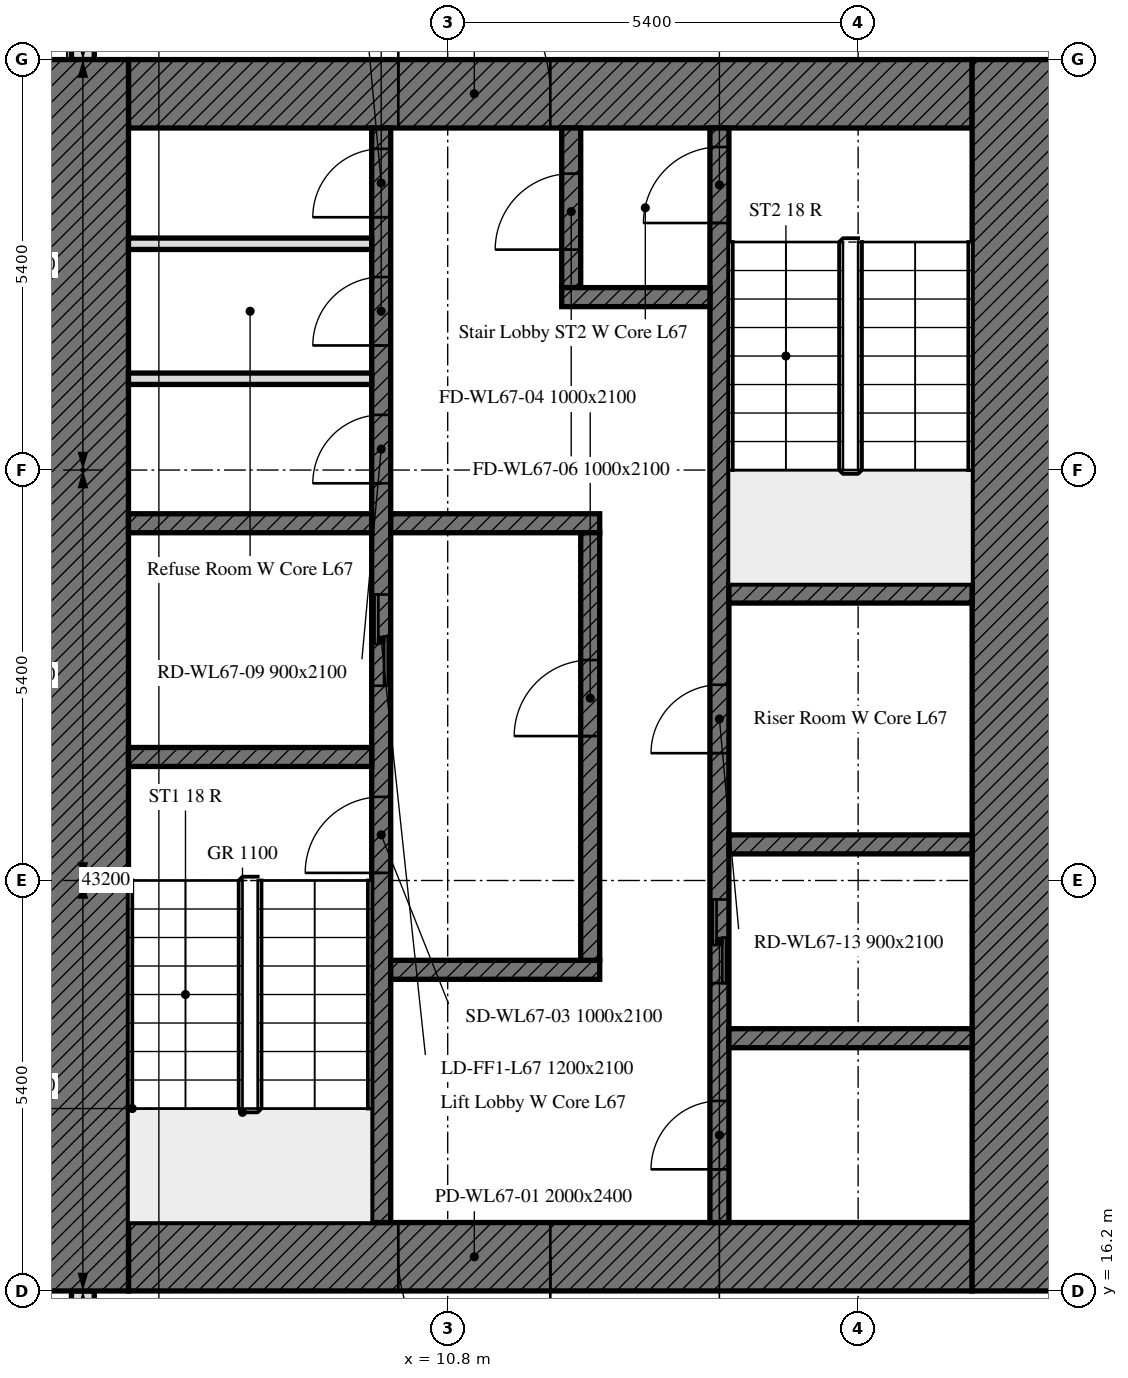
"""IFC4 building model, lengths in metres.
Left out: names, types, materials, properties, quantities, classifications, styles, units other than length and angle.
Written with IfcOpenShell. Run it as: python <this file> out.ifc"""

import sys

from ifc_helpers import new_model, si_unit, direction, frame, frame_2d, origin, place, context, subcontext, project, spatial, rectangle, extrude, element, fill, save


model = new_model("IFC4")
c1 = context("Model", 3, precision=1e-05, world=origin(), true_north=direction((0.0, 1.0)))
c2 = subcontext(c1, "Body", "Model", "MODEL_VIEW")
j1 = project(units=[si_unit("LENGTHUNIT", "METRE"), si_unit("PLANEANGLEUNIT", "RADIAN")], contexts=[c1])
p1 = place(None, origin())
s1 = spatial("IfcSite", under=j1, at=p1, CompositionType="ELEMENT")
p2 = place(p1, origin())
s2 = spatial("IfcBuilding", under=s1, at=p2, CompositionType="ELEMENT")
p3 = place(p2, frame((0.0, 0.0, 275.2)))
s3 = spatial("IfcBuildingStorey", under=s2, at=p3, CompositionType="ELEMENT", Elevation=275.2)
p4 = place(p3, frame((6.0, 37.614, 0.0), z_axis=(0.0, 0.0, 1.0), x_axis=(0.0, -1.0, 0.0)))
e1 = element("IfcWall", 1, at=p4, inside=s3, PredefinedType="SOLIDWALL", context=c2, shape_type="SweptSolid", body=[
    extrude(rectangle(XDim=5.214, YDim=0.3, at=frame_2d((2.607, 0.0))), origin(), (0.0, 0.0, 1.0), 3.0),
])
p5 = place(p4, frame((1.164, 0.0, 0.9)))
e2 = element("IfcOpeningElement", 2, at=p5, cuts=e1, PredefinedType="OPENING", context=c2, shape_type="SweptSolid", body=[
    extrude(rectangle(XDim=1.1, YDim=1.7, at=frame_2d((0.55, 0.85))), frame((0.0, 0.16, 0.0), z_axis=(0.0, -1.0, 0.0), x_axis=(1.0, 0.0, 0.0)), (0.0, 0.0, 1.0), 0.32),
])
p6 = place(p4, frame((2.589, 0.0, 0.9)))
e3 = element("IfcOpeningElement", 3, at=p6, cuts=e1, PredefinedType="OPENING", context=c2, shape_type="SweptSolid", body=[
    extrude(rectangle(XDim=0.65, YDim=1.7, at=frame_2d((0.325, 0.85))), frame((0.0, 0.16, 0.0), z_axis=(0.0, -1.0, 0.0), x_axis=(1.0, 0.0, 0.0)), (0.0, 0.0, 1.0), 0.32),
])
p7 = place(p3, frame((6.0, 16.2, 0.0), z_axis=(0.0, 0.0, 1.0), x_axis=(0.0, -1.0, 0.0)))
e4 = element("IfcWall", 4, at=p7, inside=s3, PredefinedType="SOLIDWALL", context=c2, shape_type="SweptSolid", body=[
    extrude(rectangle(XDim=10.614, YDim=0.3, at=frame_2d((5.307, 0.0))), origin(), (0.0, 0.0, 1.0), 3.0),
])
p8 = place(p7, frame((1.975, 0.0, 0.9)))
e5 = element("IfcOpeningElement", 5, at=p8, cuts=e4, PredefinedType="OPENING", context=c2, shape_type="SweptSolid", body=[
    extrude(rectangle(XDim=0.65, YDim=1.7, at=frame_2d((0.325, 0.85))), frame((0.0, 0.16, 0.0), z_axis=(0.0, -1.0, 0.0), x_axis=(1.0, 0.0, 0.0)), (0.0, 0.0, 1.0), 0.32),
])
p9 = place(p7, frame((2.95, 0.0, 0.9)))
e6 = element("IfcOpeningElement", 6, at=p9, cuts=e4, PredefinedType="OPENING", context=c2, shape_type="SweptSolid", body=[
    extrude(rectangle(XDim=1.1, YDim=1.7, at=frame_2d((0.55, 0.85))), frame((0.0, 0.16, 0.0), z_axis=(0.0, -1.0, 0.0), x_axis=(1.0, 0.0, 0.0)), (0.0, 0.0, 1.0), 0.32),
])
p10 = place(p7, frame((6.75, 0.0, 0.9)))
e7 = element("IfcOpeningElement", 7, at=p10, cuts=e4, PredefinedType="OPENING", context=c2, shape_type="SweptSolid", body=[
    extrude(rectangle(XDim=1.1, YDim=1.7, at=frame_2d((0.55, 0.85))), frame((0.0, 0.16, 0.0), z_axis=(0.0, -1.0, 0.0), x_axis=(1.0, 0.0, 0.0)), (0.0, 0.0, 1.0), 0.32),
])
p11 = place(p7, frame((8.175, 0.0, 0.9)))
e8 = element("IfcOpeningElement", 8, at=p11, cuts=e4, PredefinedType="OPENING", context=c2, shape_type="SweptSolid", body=[
    extrude(rectangle(XDim=0.65, YDim=1.7, at=frame_2d((0.325, 0.85))), frame((0.0, 0.16, 0.0), z_axis=(0.0, -1.0, 0.0), x_axis=(1.0, 0.0, 0.0)), (0.0, 0.0, 1.0), 0.32),
])
p12 = place(p3, frame((17.7, 16.65, 0.0), z_axis=(0.0, 0.0, 1.0), x_axis=(-1.0, 0.0, 0.0)))
e9 = element("IfcWall", 9, at=p12, inside=s3, PredefinedType="SOLIDWALL", context=c2, shape_type="SweptSolid", body=[
    extrude(rectangle(XDim=11.1, YDim=0.9, at=frame_2d((5.55, 0.0))), origin(), (0.0, 0.0, 1.0), 3.0),
])
p13 = place(p12, frame((5.55, 0.0, 0.0)))
e10 = element("IfcOpeningElement", 10, at=p13, cuts=e9, PredefinedType="OPENING", context=c2, shape_type="SweptSolid", body=[
    extrude(rectangle(XDim=2.0, YDim=2.4, at=frame_2d((1.0, 1.2))), frame((0.0, 0.45, 0.0), z_axis=(0.0, -1.0, 0.0), x_axis=(1.0, 0.0, 0.0)), (0.0, 0.0, 1.0), 0.9),
])
p14 = place(p3, frame((6.6, 31.95, 0.0), z_axis=(0.0, 0.0, 1.0), x_axis=(1.0, 0.0, 0.0)))
e11 = element("IfcWall", 11, at=p14, inside=s3, PredefinedType="SOLIDWALL", context=c2, shape_type="SweptSolid", body=[
    extrude(rectangle(XDim=11.1, YDim=0.9, at=frame_2d((5.55, 0.0))), origin(), (0.0, 0.0, 1.0), 3.0),
])
p15 = place(p14, frame((3.55, 0.0, 0.0)))
e12 = element("IfcOpeningElement", 12, at=p15, cuts=e11, PredefinedType="OPENING", context=c2, shape_type="SweptSolid", body=[
    extrude(rectangle(XDim=2.0, YDim=2.4, at=frame_2d((1.0, 1.2))), frame((0.0, 0.45, 0.0), z_axis=(0.0, -1.0, 0.0), x_axis=(1.0, 0.0, 0.0)), (0.0, 0.0, 1.0), 0.9),
])
for number, where, z_axis, x_axis in (
    (13, (6.0, 16.2, 0.0), (0.0, 0.0, 1.0), (0.0, 1.0, 0.0)),
    (14, (18.3, 32.4, 0.0), (0.0, 0.0, 1.0), (0.0, -1.0, 0.0)),
):
    element("IfcWall", number, at=place(p3, frame(where, z_axis=z_axis, x_axis=x_axis)), inside=s3, PredefinedType="SOLIDWALL", context=c2, shape_type="SweptSolid", body=[
        extrude(rectangle(XDim=16.2, YDim=1.2, at=frame_2d((8.1, 0.0))), origin(), (0.0, 0.0, 1.0), 3.0),
    ])
p16 = place(p3, frame((9.925, 17.1, 0.0), z_axis=(0.0, 0.0, 1.0), x_axis=(0.0, 1.0, 0.0)))
e15 = element("IfcWall", 15, at=p16, inside=s3, PredefinedType="SOLIDWALL", context=c2, shape_type="SweptSolid", body=[
    extrude(rectangle(XDim=14.4, YDim=0.25, at=frame_2d((7.2, 0.0))), origin(), (0.0, 0.0, 1.0), 3.0),
])
p17 = place(p16, frame((4.6, 0.0, 0.0)))
e16 = element("IfcOpeningElement", 16, at=p17, cuts=e15, PredefinedType="OPENING", context=c2, shape_type="SweptSolid", body=[
    extrude(rectangle(XDim=1.0, YDim=2.1, at=frame_2d((0.5, 1.05))), frame((0.0, 0.125, 0.0), z_axis=(0.0, -1.0, 0.0), x_axis=(1.0, 0.0, 0.0)), (0.0, 0.0, 1.0), 0.25),
])
p18 = place(p16, frame((7.062, 0.0, 0.0)))
e17 = element("IfcOpeningElement", 17, at=p18, cuts=e15, PredefinedType="OPENING", context=c2, shape_type="SweptSolid", body=[
    extrude(rectangle(XDim=1.2, YDim=2.1, at=frame_2d((0.6, 1.05))), frame((0.0, 0.125, 0.0), z_axis=(0.0, -1.0, 0.0), x_axis=(1.0, 0.0, 0.0)), (0.0, 0.0, 1.0), 0.25),
])
p19 = place(p16, frame((9.726, 0.0, 0.0)))
e18 = element("IfcOpeningElement", 18, at=p19, cuts=e15, PredefinedType="OPENING", context=c2, shape_type="SweptSolid", body=[
    extrude(rectangle(XDim=0.9, YDim=2.1, at=frame_2d((0.45, 1.05))), frame((0.0, 0.125, 0.0), z_axis=(0.0, -1.0, 0.0), x_axis=(1.0, 0.0, 0.0)), (0.0, 0.0, 1.0), 0.25),
])
p20 = place(p16, frame((11.539, 0.0, 0.0)))
e19 = element("IfcOpeningElement", 19, at=p20, cuts=e15, PredefinedType="OPENING", context=c2, shape_type="SweptSolid", body=[
    extrude(rectangle(XDim=0.9, YDim=2.1, at=frame_2d((0.45, 1.05))), frame((0.0, 0.125, 0.0), z_axis=(0.0, -1.0, 0.0), x_axis=(1.0, 0.0, 0.0)), (0.0, 0.0, 1.0), 0.25),
])
p21 = place(p16, frame((13.226, 0.0, 0.0)))
e20 = element("IfcOpeningElement", 20, at=p21, cuts=e15, PredefinedType="OPENING", context=c2, shape_type="SweptSolid", body=[
    extrude(rectangle(XDim=0.9, YDim=2.1, at=frame_2d((0.45, 1.05))), frame((0.0, 0.125, 0.0), z_axis=(0.0, -1.0, 0.0), x_axis=(1.0, 0.0, 0.0)), (0.0, 0.0, 1.0), 0.25),
])
p22 = place(p3, frame((14.375, 17.1, 0.0), z_axis=(0.0, 0.0, 1.0), x_axis=(0.0, 1.0, 0.0)))
e21 = element("IfcWall", 21, at=p22, inside=s3, PredefinedType="SOLIDWALL", context=c2, shape_type="SweptSolid", body=[
    extrude(rectangle(XDim=14.4, YDim=0.25, at=frame_2d((7.2, 0.0))), origin(), (0.0, 0.0, 1.0), 3.0),
])
p23 = place(p22, frame((13.15, 0.0, 0.0)))
e22 = element("IfcOpeningElement", 22, at=p23, cuts=e21, PredefinedType="OPENING", context=c2, shape_type="SweptSolid", body=[
    extrude(rectangle(XDim=1.0, YDim=2.1, at=frame_2d((0.5, 1.05))), frame((0.0, 0.125, 0.0), z_axis=(0.0, -1.0, 0.0), x_axis=(1.0, 0.0, 0.0)), (0.0, 0.0, 1.0), 0.25),
])
p24 = place(p22, frame((3.15, 0.0, 0.0)))
e23 = element("IfcOpeningElement", 23, at=p24, cuts=e21, PredefinedType="OPENING", context=c2, shape_type="SweptSolid", body=[
    extrude(rectangle(XDim=1.1, YDim=2.1, at=frame_2d((0.55, 1.05))), frame((0.0, 0.125, 0.0), z_axis=(0.0, -1.0, 0.0), x_axis=(1.0, 0.0, 0.0)), (0.0, 0.0, 1.0), 0.25),
])
p25 = place(p22, frame((0.7, 0.0, 0.0)))
e24 = element("IfcOpeningElement", 24, at=p25, cuts=e21, PredefinedType="OPENING", context=c2, shape_type="SweptSolid", body=[
    extrude(rectangle(XDim=0.9, YDim=2.1, at=frame_2d((0.45, 1.05))), frame((0.0, 0.125, 0.0), z_axis=(0.0, -1.0, 0.0), x_axis=(1.0, 0.0, 0.0)), (0.0, 0.0, 1.0), 0.25),
])
p26 = place(p22, frame((6.175, 0.0, 0.0)))
e25 = element("IfcOpeningElement", 25, at=p26, cuts=e21, PredefinedType="OPENING", context=c2, shape_type="SweptSolid", body=[
    extrude(rectangle(XDim=0.9, YDim=2.1, at=frame_2d((0.45, 1.05))), frame((0.0, 0.125, 0.0), z_axis=(0.0, -1.0, 0.0), x_axis=(1.0, 0.0, 0.0)), (0.0, 0.0, 1.0), 0.25),
])
for number, where, z_axis, x_axis in (
    (26, (6.6, 23.225, 0.0), (0.0, 0.0, 1.0), (1.0, 0.0, 0.0)),
    (27, (14.5, 25.375, 0.0), (0.0, 0.0, 1.0), (1.0, 0.0, 0.0)),
    (28, (14.5, 22.075, 0.0), (0.0, 0.0, 1.0), (1.0, 0.0, 0.0)),
    (29, (6.6, 26.3, 0.0), (0.0, 0.0, 1.0), (1.0, 0.0, 0.0)),
):
    element("IfcWall", number, at=place(p3, frame(where, z_axis=z_axis, x_axis=x_axis)), inside=s3, PredefinedType="SOLIDWALL", context=c2, shape_type="SweptSolid", body=[
        extrude(rectangle(XDim=3.2, YDim=0.25, at=frame_2d((1.6, 0.0))), origin(), (0.0, 0.0, 1.0), 3.0),
    ])
for number, where, z_axis, x_axis in (
    (30, (10.05, 26.3, 0.0), (0.0, 0.0, 1.0), (1.0, 0.0, 0.0)),
    (31, (10.05, 20.425, 0.0), (0.0, 0.0, 1.0), (1.0, 0.0, 0.0)),
):
    element("IfcWall", number, at=place(p3, frame(where, z_axis=z_axis, x_axis=x_axis)), inside=s3, PredefinedType="SOLIDWALL", context=c2, shape_type="SweptSolid", body=[
        extrude(rectangle(XDim=2.75, YDim=0.25, at=frame_2d((1.375, 0.0))), origin(), (0.0, 0.0, 1.0), 3.0),
    ])
p27 = place(p3, frame((12.425, 29.4, 0.0), z_axis=(0.0, 0.0, 1.0), x_axis=(0.0, 1.0, 0.0)))
e32 = element("IfcWall", 32, at=p27, inside=s3, PredefinedType="SOLIDWALL", context=c2, shape_type="SweptSolid", body=[
    extrude(rectangle(XDim=2.1, YDim=0.25, at=frame_2d((1.05, 0.0))), origin(), (0.0, 0.0, 1.0), 3.0),
])
p28 = place(p27, frame((0.5, 0.0, 0.0)))
e33 = element("IfcOpeningElement", 33, at=p28, cuts=e32, PredefinedType="OPENING", context=c2, shape_type="SweptSolid", body=[
    extrude(rectangle(XDim=1.0, YDim=2.1, at=frame_2d((0.5, 1.05))), frame((0.0, 0.125, 0.0), z_axis=(0.0, -1.0, 0.0), x_axis=(1.0, 0.0, 0.0)), (0.0, 0.0, 1.0), 0.25),
])
p29 = place(p3, frame((12.3, 29.275, 0.0), z_axis=(0.0, 0.0, 1.0), x_axis=(1.0, 0.0, 0.0)))
e34 = element("IfcWall", 34, at=p29, inside=s3, PredefinedType="SOLIDWALL", context=c2, shape_type="SweptSolid", body=[
    extrude(rectangle(XDim=1.95, YDim=0.25, at=frame_2d((0.975, 0.0))), origin(), (0.0, 0.0, 1.0), 3.0),
])
p30 = place(p3, frame((12.675, 20.55, 0.0), z_axis=(0.0, 0.0, 1.0), x_axis=(0.0, 1.0, 0.0)))
e35 = element("IfcWall", 35, at=p30, inside=s3, PredefinedType="SOLIDWALL", context=c2, shape_type="SweptSolid", body=[
    extrude(rectangle(XDim=5.625, YDim=0.25, at=frame_2d((2.812, 0.0))), origin(), (0.0, 0.0, 1.0), 3.0),
])
p31 = place(p30, frame((2.95, 0.0, 0.0)))
e36 = element("IfcOpeningElement", 36, at=p31, cuts=e35, PredefinedType="OPENING", context=c2, shape_type="SweptSolid", body=[
    extrude(rectangle(XDim=1.0, YDim=2.1, at=frame_2d((0.5, 1.05))), frame((0.0, 0.125, 0.0), z_axis=(0.0, -1.0, 0.0), x_axis=(1.0, 0.0, 0.0)), (0.0, 0.0, 1.0), 0.25),
])
p32 = place(p3, frame((14.5, 19.525, 0.0), z_axis=(0.0, 0.0, 1.0), x_axis=(1.0, 0.0, 0.0)))
e37 = element("IfcWall", 37, at=p32, inside=s3, PredefinedType="SOLIDWALL", context=c2, shape_type="SweptSolid", body=[
    extrude(rectangle(XDim=3.2, YDim=0.25, at=frame_2d((1.6, 0.0))), origin(), (0.0, 0.0, 1.0), 3.0),
])
for number, where, z_axis, x_axis in (
    (38, (6.6, 28.201, 0.0), (0.0, 0.0, 1.0), (1.0, 0.0, 0.0)),
    (39, (6.6, 29.977, 0.0), (0.0, 0.0, 1.0), (1.0, 0.0, 0.0)),
):
    element("IfcWall", number, at=place(p3, frame(where, z_axis=z_axis, x_axis=x_axis)), inside=s3, PredefinedType="PARTITIONING", context=c2, shape_type="SweptSolid", body=[
        extrude(rectangle(XDim=3.2, YDim=0.15, at=frame_2d((1.6, 0.0))), origin(), (0.0, 0.0, 1.0), 3.0),
    ])
p33 = place(p13, origin())
e40 = element("IfcDoor", 40, at=p33, inside=s3, OperationType="DOUBLE_DOOR_SINGLE_SWING", PredefinedType="DOOR", context=c2, shape_type="SweptSolid", body=[
    extrude(rectangle(XDim=2.0, YDim=2.4, at=frame_2d((1.0, 1.2))), frame((0.0, 0.025, 0.0), z_axis=(0.0, -1.0, 0.0), x_axis=(1.0, 0.0, 0.0)), (0.0, 0.0, 1.0), 0.05),
])
fill(e10, e40)
p34 = place(p15, origin())
e41 = element("IfcDoor", 41, at=p34, inside=s3, OperationType="DOUBLE_DOOR_SINGLE_SWING", PredefinedType="DOOR", context=c2, shape_type="SweptSolid", body=[
    extrude(rectangle(XDim=2.0, YDim=2.4, at=frame_2d((1.0, 1.2))), frame((0.0, 0.025, 0.0), z_axis=(0.0, -1.0, 0.0), x_axis=(1.0, 0.0, 0.0)), (0.0, 0.0, 1.0), 0.05),
])
fill(e12, e41)
p35 = place(p17, origin())
e42 = element("IfcDoor", 42, at=p35, inside=s3, OperationType="SINGLE_SWING_LEFT", PredefinedType="DOOR", context=c2, shape_type="SweptSolid", body=[
    extrude(rectangle(XDim=1.0, YDim=2.1, at=frame_2d((0.5, 1.05))), frame((0.0, 0.025, 0.0), z_axis=(0.0, -1.0, 0.0), x_axis=(1.0, 0.0, 0.0)), (0.0, 0.0, 1.0), 0.05),
])
fill(e16, e42)
p36 = place(p31, origin())
e43 = element("IfcDoor", 43, at=p36, inside=s3, OperationType="SINGLE_SWING_LEFT", PredefinedType="DOOR", context=c2, shape_type="SweptSolid", body=[
    extrude(rectangle(XDim=1.0, YDim=2.1, at=frame_2d((0.5, 1.05))), frame((0.0, 0.025, 0.0), z_axis=(0.0, -1.0, 0.0), x_axis=(1.0, 0.0, 0.0)), (0.0, 0.0, 1.0), 0.05),
])
fill(e36, e43)
p37 = place(p23, origin())
e44 = element("IfcDoor", 44, at=p37, inside=s3, OperationType="SINGLE_SWING_LEFT", PredefinedType="DOOR", context=c2, shape_type="SweptSolid", body=[
    extrude(rectangle(XDim=1.0, YDim=2.1, at=frame_2d((0.5, 1.05))), frame((0.0, 0.025, 0.0), z_axis=(0.0, -1.0, 0.0), x_axis=(1.0, 0.0, 0.0)), (0.0, 0.0, 1.0), 0.05),
])
fill(e22, e44)
p38 = place(p28, origin())
e45 = element("IfcDoor", 45, at=p38, inside=s3, OperationType="SINGLE_SWING_LEFT", PredefinedType="DOOR", context=c2, shape_type="SweptSolid", body=[
    extrude(rectangle(XDim=1.0, YDim=2.1, at=frame_2d((0.5, 1.05))), frame((0.0, 0.025, 0.0), z_axis=(0.0, -1.0, 0.0), x_axis=(1.0, 0.0, 0.0)), (0.0, 0.0, 1.0), 0.05),
])
fill(e33, e45)
p39 = place(p18, origin())
e46 = element("IfcDoor", 46, at=p39, inside=s3, OperationType="DOUBLE_DOOR_SLIDING", PredefinedType="DOOR", context=c2, shape_type="SweptSolid", body=[
    extrude(rectangle(XDim=1.2, YDim=2.1, at=frame_2d((0.6, 1.05))), frame((0.0, 0.025, 0.0), z_axis=(0.0, -1.0, 0.0), x_axis=(1.0, 0.0, 0.0)), (0.0, 0.0, 1.0), 0.05),
])
fill(e17, e46)
p40 = place(p24, origin())
e47 = element("IfcDoor", 47, at=p40, inside=s3, OperationType="DOUBLE_DOOR_SLIDING", PredefinedType="DOOR", context=c2, shape_type="SweptSolid", body=[
    extrude(rectangle(XDim=1.1, YDim=2.1, at=frame_2d((0.55, 1.05))), frame((0.0, 0.025, 0.0), z_axis=(0.0, -1.0, 0.0), x_axis=(1.0, 0.0, 0.0)), (0.0, 0.0, 1.0), 0.05),
])
fill(e23, e47)
p41 = place(p19, origin())
e48 = element("IfcDoor", 48, at=p41, inside=s3, OperationType="SINGLE_SWING_LEFT", PredefinedType="DOOR", context=c2, shape_type="SweptSolid", body=[
    extrude(rectangle(XDim=0.9, YDim=2.1, at=frame_2d((0.45, 1.05))), frame((0.0, 0.025, 0.0), z_axis=(0.0, -1.0, 0.0), x_axis=(1.0, 0.0, 0.0)), (0.0, 0.0, 1.0), 0.05),
])
fill(e18, e48)
p42 = place(p20, origin())
e49 = element("IfcDoor", 49, at=p42, inside=s3, OperationType="SINGLE_SWING_LEFT", PredefinedType="DOOR", context=c2, shape_type="SweptSolid", body=[
    extrude(rectangle(XDim=0.9, YDim=2.1, at=frame_2d((0.45, 1.05))), frame((0.0, 0.025, 0.0), z_axis=(0.0, -1.0, 0.0), x_axis=(1.0, 0.0, 0.0)), (0.0, 0.0, 1.0), 0.05),
])
fill(e19, e49)
p43 = place(p21, origin())
e50 = element("IfcDoor", 50, at=p43, inside=s3, OperationType="SINGLE_SWING_LEFT", PredefinedType="DOOR", context=c2, shape_type="SweptSolid", body=[
    extrude(rectangle(XDim=0.9, YDim=2.1, at=frame_2d((0.45, 1.05))), frame((0.0, 0.025, 0.0), z_axis=(0.0, -1.0, 0.0), x_axis=(1.0, 0.0, 0.0)), (0.0, 0.0, 1.0), 0.05),
])
fill(e20, e50)
p44 = place(p25, origin())
e51 = element("IfcDoor", 51, at=p44, inside=s3, OperationType="SINGLE_SWING_LEFT", PredefinedType="DOOR", context=c2, shape_type="SweptSolid", body=[
    extrude(rectangle(XDim=0.9, YDim=2.1, at=frame_2d((0.45, 1.05))), frame((0.0, 0.025, 0.0), z_axis=(0.0, -1.0, 0.0), x_axis=(1.0, 0.0, 0.0)), (0.0, 0.0, 1.0), 0.05),
])
fill(e24, e51)
p45 = place(p26, origin())
e52 = element("IfcDoor", 52, at=p45, inside=s3, OperationType="SINGLE_SWING_LEFT", PredefinedType="DOOR", context=c2, shape_type="SweptSolid", body=[
    extrude(rectangle(XDim=0.9, YDim=2.1, at=frame_2d((0.45, 1.05))), frame((0.0, 0.025, 0.0), z_axis=(0.0, -1.0, 0.0), x_axis=(1.0, 0.0, 0.0)), (0.0, 0.0, 1.0), 0.05),
])
fill(e25, e52)
save(model, sys.argv[1])
